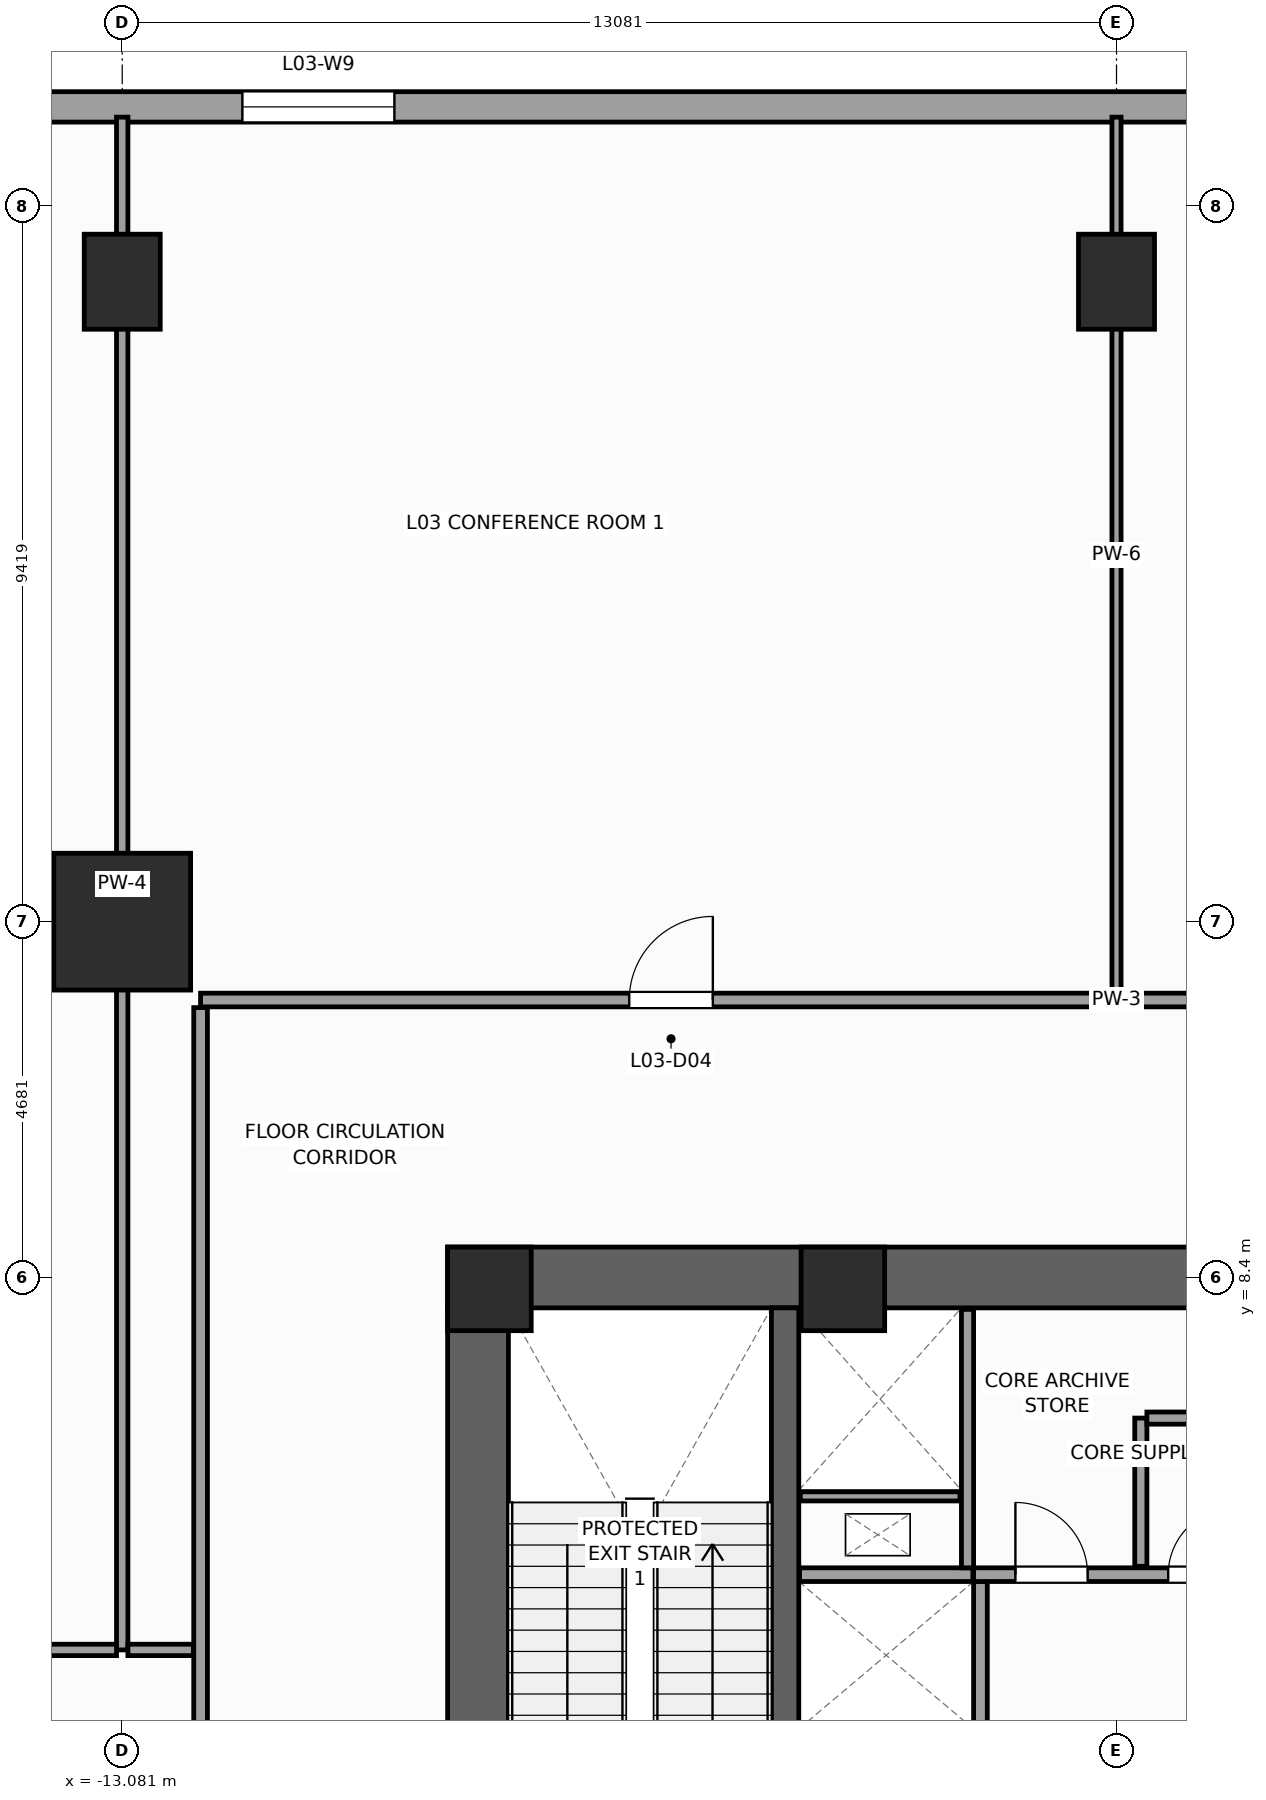
"""IFC4 building model, lengths in metres.
Left out: names, types, materials, properties, quantities, classifications, styles, units other than length and angle.
Written with IfcOpenShell. Run it as: python <this file> out.ifc"""

import sys

from ifc_helpers import new_model, si_unit, direction, frame, frame_2d, origin, origin_2d, place, context, subcontext, project, spatial, rectangle, extrude, source, transform, mapped, element, fill, save


model = new_model("IFC4")
c1 = context("Model", 3, precision=1e-05, world=origin(), true_north=direction((0.0, 1.0)))
c2 = subcontext(c1, "Body", "Model", "MODEL_VIEW")
j1 = project(units=[si_unit("LENGTHUNIT", "METRE"), si_unit("PLANEANGLEUNIT", "RADIAN")], contexts=[c1])
p1 = place(None, origin())
s1 = spatial("IfcSite", under=j1, at=p1, CompositionType="ELEMENT")
p2 = place(p1, origin())
s2 = spatial("IfcBuilding", under=s1, at=p2, CompositionType="ELEMENT")
p3 = place(p2, frame((0.0, 0.0, 16.0)))
s3 = spatial("IfcBuildingStorey", under=s2, at=p3, CompositionType="ELEMENT", Elevation=16.0)
p4 = place(p3, frame((-8.8, 8.4, 0.0), z_axis=(0.0, 0.0, 1.0), x_axis=(1.0, 0.0, 0.0)))
e1 = element("IfcWall", 1, at=p4, inside=s3, PredefinedType="SHEAR", context=c2, shape_type="SweptSolid", body=[
    extrude(rectangle(XDim=17.6, YDim=0.8, at=frame_2d((8.8, 0.0))), origin(), (0.0, 0.0, 1.0), 5.0),
])
p5 = place(p3, frame((-8.4, -8.0, 0.0), z_axis=(0.0, 0.0, 1.0), x_axis=(0.0, 1.0, 0.0)))
e2 = element("IfcWall", 2, at=p5, inside=s3, PredefinedType="SHEAR", context=c2, shape_type="SweptSolid", body=[
    extrude(rectangle(XDim=16.0, YDim=0.8, at=frame_2d((8.0, 0.0))), origin(), (0.0, 0.0, 1.0), 5.0),
])
p6 = place(p5, frame((4.69, 0.0, 0.0)))
e3 = element("IfcOpeningElement", 3, at=p6, cuts=e2, PredefinedType="OPENING", context=c2, shape_type="SweptSolid", body=[
    extrude(rectangle(XDim=1.3, YDim=2.2, at=frame_2d((0.65, 1.1))), frame((0.0, 0.41, 0.0), z_axis=(0.0, -1.0, 0.0), x_axis=(1.0, 0.0, 0.0)), (0.0, 0.0, 1.0), 0.82),
])
p7 = place(p3, frame((-4.36, -8.0, 0.0), z_axis=(0.0, 0.0, 1.0), x_axis=(0.0, 1.0, 0.0)))
e4 = element("IfcWall", 4, at=p7, inside=s3, PredefinedType="SHEAR", context=c2, shape_type="SweptSolid", body=[
    extrude(rectangle(XDim=16.0, YDim=0.36, at=frame_2d((8.0, 0.0))), origin(), (0.0, 0.0, 1.0), 5.0),
])
m1 = source(origin(), c2, "Body", "SweptSolid", [
    extrude(rectangle(XDim=1.1, YDim=1.1, at=origin_2d()), origin(), (0.0, 0.0, 1.0), 5.0),
])
for number, where, z_axis, x_axis in (
    (5, (-8.25, 8.25, 0.0), (0.0, 0.0, 1.0), (1.0, 0.0, 0.0)),
    (6, (-3.6, 8.25, 0.0), (0.0, 0.0, 1.0), (1.0, 0.0, 0.0)),
):
    element("IfcColumn", number, at=place(p3, frame(where, z_axis=z_axis, x_axis=x_axis)), inside=s3, PredefinedType="PILASTER", context=c2, shape_type="MappedRepresentation", body=[
        mapped(m1, transform((0.0, 0.0, 0.0), scale=1.0)),
    ])
m2 = source(origin(), c2, "Body", "SweptSolid", [
    extrude(rectangle(XDim=1.8, YDim=1.8, at=origin_2d()), origin(), (0.0, 0.0, 1.0), 5.0),
])
p8 = place(p3, frame((-13.081, 13.081, 0.0), z_axis=(0.0, 0.0, 1.0), x_axis=(1.0, 0.0, 0.0)))
e7 = element("IfcColumn", 7, at=p8, inside=s3, PredefinedType="COLUMN", context=c2, shape_type="MappedRepresentation", body=[
    mapped(m2, transform((0.0, 0.0, 0.0), scale=1.0)),
])
m3 = source(origin(), c2, "Body", "SweptSolid", [
    extrude(rectangle(XDim=1.0, YDim=1.25, at=origin_2d()), origin(), (0.0, 0.0, 1.0), 5.0),
])
for number, where, z_axis, x_axis in (
    (8, (-13.081, 21.5, 0.0), (0.0, 0.0, 1.0), (1.0, 0.0, 0.0)),
    (9, (0.0, 21.5, 0.0), (0.0, 0.0, 1.0), (1.0, 0.0, 0.0)),
):
    element("IfcColumn", number, at=place(p3, frame(where, z_axis=z_axis, x_axis=x_axis)), inside=s3, PredefinedType="COLUMN", context=c2, shape_type="MappedRepresentation", body=[
        mapped(m3, transform((0.0, 0.0, 0.0), scale=1.0)),
    ])
p9 = place(p3, frame((-33.0, 23.8, 0.0), z_axis=(0.0, 0.0, 1.0), x_axis=(1.0, 0.0, 0.0)))
e10 = element("IfcWall", 10, at=p9, inside=s3, PredefinedType="STANDARD", context=c2, shape_type="SweptSolid", body=[
    extrude(rectangle(XDim=34.5, YDim=0.4, at=frame_2d((17.25, 0.0))), origin(), (0.0, 0.0, 1.0), 4.66),
])
p10 = place(p9, frame((11.0, 0.0, 0.85)))
e11 = element("IfcOpeningElement", 11, at=p10, cuts=e10, PredefinedType="OPENING", context=c2, shape_type="SweptSolid", body=[
    extrude(rectangle(XDim=2.0, YDim=2.8, at=frame_2d((1.0, 1.4))), frame((0.0, 0.21, 0.0), z_axis=(0.0, -1.0, 0.0), x_axis=(1.0, 0.0, 0.0)), (0.0, 0.0, 1.0), 0.42),
])
p11 = place(p9, frame((16.0, 0.0, 0.85)))
e12 = element("IfcOpeningElement", 12, at=p11, cuts=e10, PredefinedType="OPENING", context=c2, shape_type="SweptSolid", body=[
    extrude(rectangle(XDim=2.0, YDim=2.8, at=frame_2d((1.0, 1.4))), frame((0.0, 0.21, 0.0), z_axis=(0.0, -1.0, 0.0), x_axis=(1.0, 0.0, 0.0)), (0.0, 0.0, 1.0), 0.42),
])
p12 = place(p9, frame((21.5, 0.0, 0.85)))
e13 = element("IfcOpeningElement", 13, at=p12, cuts=e10, PredefinedType="OPENING", context=c2, shape_type="SweptSolid", body=[
    extrude(rectangle(XDim=2.0, YDim=2.8, at=frame_2d((1.0, 1.4))), frame((0.0, 0.21, 0.0), z_axis=(0.0, -1.0, 0.0), x_axis=(1.0, 0.0, 0.0)), (0.0, 0.0, 1.0), 0.42),
])
p13 = place(p3, frame((-1.79, -7.98, 0.0), z_axis=(0.0, 0.0, 1.0), x_axis=(0.0, 1.0, 0.0)))
e14 = element("IfcWall", 14, at=p13, inside=s3, PredefinedType="PARTITIONING", context=c2, shape_type="SweptSolid", body=[
    extrude(rectangle(XDim=12.38, YDim=0.18, at=frame_2d((6.19, 0.0))), origin(), (0.0, 0.0, 1.0), 4.66),
])
p14 = place(p13, frame((0.4, 0.0, 0.0)))
e15 = element("IfcOpeningElement", 15, at=p14, cuts=e14, PredefinedType="OPENING", context=c2, shape_type="SweptSolid", body=[
    extrude(rectangle(XDim=1.1, YDim=2.2, at=frame_2d((0.55, 1.1))), frame((0.0, 0.1, 0.0), z_axis=(0.0, -1.0, 0.0), x_axis=(1.0, 0.0, 0.0)), (0.0, 0.0, 1.0), 0.2),
])
p15 = place(p13, frame((2.46, 0.0, 0.0)))
e16 = element("IfcOpeningElement", 16, at=p15, cuts=e14, PredefinedType="OPENING", context=c2, shape_type="SweptSolid", body=[
    extrude(rectangle(XDim=1.1, YDim=2.2, at=frame_2d((0.55, 1.1))), frame((0.0, 0.1, 0.0), z_axis=(0.0, -1.0, 0.0), x_axis=(1.0, 0.0, 0.0)), (0.0, 0.0, 1.0), 0.2),
])
p16 = place(p3, frame((-1.88, 4.49, 0.0), z_axis=(0.0, 0.0, 1.0), x_axis=(1.0, 0.0, 0.0)))
e17 = element("IfcWall", 17, at=p16, inside=s3, PredefinedType="PARTITIONING", context=c2, shape_type="SweptSolid", body=[
    extrude(rectangle(XDim=3.76, YDim=0.18, at=frame_2d((1.88, 0.0))), origin(), (0.0, 0.0, 1.0), 4.66),
])
p17 = place(p16, frame((0.55, 0.0, 0.0)))
e18 = element("IfcOpeningElement", 18, at=p17, cuts=e17, PredefinedType="OPENING", context=c2, shape_type="SweptSolid", body=[
    extrude(rectangle(XDim=0.95, YDim=2.1, at=frame_2d((0.475, 1.05))), frame((0.0, 0.1, 0.0), z_axis=(0.0, -1.0, 0.0), x_axis=(1.0, 0.0, 0.0)), (0.0, 0.0, 1.0), 0.2),
])
p18 = place(p16, frame((2.56, 0.0, 0.0)))
e19 = element("IfcOpeningElement", 19, at=p18, cuts=e17, PredefinedType="OPENING", context=c2, shape_type="SweptSolid", body=[
    extrude(rectangle(XDim=0.88, YDim=2.1, at=frame_2d((0.44, 1.05))), frame((0.0, 0.1, 0.0), z_axis=(0.0, -1.0, 0.0), x_axis=(1.0, 0.0, 0.0)), (0.0, 0.0, 1.0), 0.2),
])
p19 = place(p3, frame((-4.17, 4.49, 0.0), z_axis=(0.0, 0.0, 1.0), x_axis=(1.0, 0.0, 0.0)))
e20 = element("IfcWall", 20, at=p19, inside=s3, PredefinedType="PARTITIONING", context=c2, shape_type="SweptSolid", body=[
    extrude(rectangle(XDim=2.28, YDim=0.18, at=frame_2d((1.14, 0.0))), origin(), (0.0, 0.0, 1.0), 4.66),
])
p20 = place(p3, frame((-1.96, 4.58, 0.0), z_axis=(0.0, 0.0, 1.0), x_axis=(0.0, 1.0, 0.0)))
e21 = element("IfcWall", 21, at=p20, inside=s3, PredefinedType="PARTITIONING", context=c2, shape_type="SweptSolid", body=[
    extrude(rectangle(XDim=3.4, YDim=0.16, at=frame_2d((1.7, 0.0))), origin(), (0.0, 0.0, 1.0), 4.66),
])
p21 = place(p3, frame((-4.16, 5.52, 0.0), z_axis=(0.0, 0.0, 1.0), x_axis=(1.0, 0.0, 0.0)))
e22 = element("IfcWall", 22, at=p21, inside=s3, PredefinedType="PARTITIONING", context=c2, shape_type="SweptSolid", body=[
    extrude(rectangle(XDim=2.1, YDim=0.12, at=frame_2d((1.05, 0.0))), origin(), (0.0, 0.0, 1.0), 4.66),
])
p22 = place(p3, frame((0.32, 4.6, 0.0), z_axis=(0.0, 0.0, 1.0), x_axis=(0.0, 1.0, 0.0)))
e23 = element("IfcWall", 23, at=p22, inside=s3, PredefinedType="PARTITIONING", context=c2, shape_type="SweptSolid", body=[
    extrude(rectangle(XDim=1.95, YDim=0.16, at=frame_2d((0.975, 0.0))), origin(), (0.0, 0.0, 1.0), 4.66),
])
p23 = place(p3, frame((0.4, 6.55, 0.0), z_axis=(0.0, 0.0, 1.0), x_axis=(1.0, 0.0, 0.0)))
e24 = element("IfcWall", 24, at=p23, inside=s3, PredefinedType="PARTITIONING", context=c2, shape_type="SweptSolid", body=[
    extrude(rectangle(XDim=1.46, YDim=0.16, at=frame_2d((0.73, 0.0))), origin(), (0.0, 0.0, 1.0), 4.66),
])
p24 = place(p3, frame((-12.05, 12.05, 0.0), z_axis=(0.0, 0.0, 1.0), x_axis=(1.0, 0.0, 0.0)))
e25 = element("IfcWall", 25, at=p24, inside=s3, PredefinedType="PARTITIONING", context=c2, shape_type="SweptSolid", body=[
    extrude(rectangle(XDim=24.1, YDim=0.18, at=frame_2d((12.05, 0.0))), origin(), (0.0, 0.0, 1.0), 4.66),
])
p25 = place(p24, frame((5.639, 0.0, 0.0)))
e26 = element("IfcOpeningElement", 26, at=p25, cuts=e25, PredefinedType="OPENING", context=c2, shape_type="SweptSolid", body=[
    extrude(rectangle(XDim=1.1, YDim=2.2, at=frame_2d((0.55, 1.1))), frame((0.0, 0.1, 0.0), z_axis=(0.0, -1.0, 0.0), x_axis=(1.0, 0.0, 0.0)), (0.0, 0.0, 1.0), 0.2),
])
p26 = place(p24, frame((17.361, 0.0, 0.0)))
e27 = element("IfcOpeningElement", 27, at=p26, cuts=e25, PredefinedType="OPENING", context=c2, shape_type="SweptSolid", body=[
    extrude(rectangle(XDim=1.1, YDim=2.2, at=frame_2d((0.55, 1.1))), frame((0.0, 0.1, 0.0), z_axis=(0.0, -1.0, 0.0), x_axis=(1.0, 0.0, 0.0)), (0.0, 0.0, 1.0), 0.2),
])
p27 = place(p3, frame((-12.05, -4.96, 0.0), z_axis=(0.0, 0.0, 1.0), x_axis=(0.0, 1.0, 0.0)))
e28 = element("IfcWall", 28, at=p27, inside=s3, PredefinedType="PARTITIONING", context=c2, shape_type="SweptSolid", body=[
    extrude(rectangle(XDim=16.91, YDim=0.18, at=frame_2d((8.455, 0.0))), origin(), (0.0, 0.0, 1.0), 4.66),
])
p28 = place(p27, frame((5.835, 0.0, 0.0)))
e29 = element("IfcOpeningElement", 29, at=p28, cuts=e28, PredefinedType="OPENING", context=c2, shape_type="SweptSolid", body=[
    extrude(rectangle(XDim=0.95, YDim=2.15, at=frame_2d((0.475, 1.075))), frame((0.0, 0.1, 0.0), z_axis=(0.0, -1.0, 0.0), x_axis=(1.0, 0.0, 0.0)), (0.0, 0.0, 1.0), 0.2),
])
p29 = place(p3, frame((-13.081, 3.5, 0.0), z_axis=(0.0, 0.0, 1.0), x_axis=(0.0, 1.0, 0.0)))
e30 = element("IfcWall", 30, at=p29, inside=s3, PredefinedType="PARTITIONING", context=c2, shape_type="SweptSolid", body=[
    extrude(rectangle(XDim=20.165, YDim=0.15, at=frame_2d((10.083, 0.0))), origin(), (0.0, 0.0, 1.0), 3.652),
])
p30 = place(p3, frame((0.0, 12.145, 0.0), z_axis=(0.0, 0.0, 1.0), x_axis=(0.0, 1.0, 0.0)))
e31 = element("IfcWall", 31, at=p30, inside=s3, PredefinedType="PARTITIONING", context=c2, shape_type="SweptSolid", body=[
    extrude(rectangle(XDim=11.52, YDim=0.12, at=frame_2d((5.76, 0.0))), origin(), (0.0, 0.0, 1.0), 3.95),
])
p31 = place(p3, frame((-18.96, 3.5, 0.0), z_axis=(0.0, 0.0, 1.0), x_axis=(1.0, 0.0, 0.0)))
e32 = element("IfcWall", 32, at=p31, inside=s3, PredefinedType="PARTITIONING", context=c2, shape_type="SweptSolid", body=[
    extrude(rectangle(XDim=5.804, YDim=0.15, at=frame_2d((2.902, 0.0))), origin(), (0.0, 0.0, 1.0), 4.66),
])
p32 = place(p3, frame((-13.006, 3.5, 0.0), z_axis=(0.0, 0.0, 1.0), x_axis=(1.0, 0.0, 0.0)))
e33 = element("IfcWall", 33, at=p32, inside=s3, PredefinedType="PARTITIONING", context=c2, shape_type="SweptSolid", body=[
    extrude(rectangle(XDim=0.861, YDim=0.15, at=frame_2d((0.431, 0.0))), origin(), (0.0, 0.0, 1.0), 4.66),
])
m4 = source(origin(), c2, "Body", "SweptSolid", [
    extrude(rectangle(XDim=2.0, YDim=2.8, at=frame_2d((1.0, 1.4))), frame((0.0, 0.03, 0.0), z_axis=(0.0, -1.0, 0.0), x_axis=(1.0, 0.0, 0.0)), (0.0, 0.0, 1.0), 0.06),
])
p33 = place(p12, origin())
e34 = element("IfcWindow", 34, at=p33, inside=s3, PartitioningType="SINGLE_PANEL", PredefinedType="WINDOW", context=c2, shape_type="MappedRepresentation", body=[
    mapped(m4, transform((0.0, 0.0, 0.0), scale=1.0)),
])
fill(e13, e34)
m5 = source(origin(), c2, "Body", "SweptSolid", [
    extrude(rectangle(XDim=0.95, YDim=2.1, at=frame_2d((0.475, 1.05))), frame((0.0, 0.025, 0.0), z_axis=(0.0, -1.0, 0.0), x_axis=(1.0, 0.0, 0.0)), (0.0, 0.0, 1.0), 0.05),
])
p34 = place(p17, origin())
e35 = element("IfcDoor", 35, at=p34, inside=s3, OperationType="SINGLE_SWING_LEFT", PredefinedType="DOOR", context=c2, shape_type="MappedRepresentation", body=[
    mapped(m5, transform((0.0, 0.0, 0.0), scale=1.0)),
])
fill(e18, e35)
m6 = source(origin(), c2, "Body", "SweptSolid", [
    extrude(rectangle(XDim=0.88, YDim=2.1, at=frame_2d((0.44, 1.05))), frame((0.0, 0.025, 0.0), z_axis=(0.0, -1.0, 0.0), x_axis=(1.0, 0.0, 0.0)), (0.0, 0.0, 1.0), 0.05),
])
p35 = place(p18, origin())
e36 = element("IfcDoor", 36, at=p35, inside=s3, OperationType="SINGLE_SWING_RIGHT", PredefinedType="DOOR", context=c2, shape_type="MappedRepresentation", body=[
    mapped(m6, transform((0.0, 0.0, 0.0), scale=1.0)),
])
fill(e19, e36)
m7 = source(origin(), c2, "Body", "SweptSolid", [
    extrude(rectangle(XDim=1.1, YDim=2.2, at=frame_2d((0.55, 1.1))), frame((0.0, 0.025, 0.0), z_axis=(0.0, -1.0, 0.0), x_axis=(1.0, 0.0, 0.0)), (0.0, 0.0, 1.0), 0.05),
])
p36 = place(p25, origin())
e37 = element("IfcDoor", 37, at=p36, inside=s3, OperationType="SINGLE_SWING_RIGHT", PredefinedType="DOOR", context=c2, shape_type="MappedRepresentation", body=[
    mapped(m7, transform((0.0, 0.0, 0.0), scale=1.0)),
])
fill(e26, e37)
save(model, sys.argv[1])
